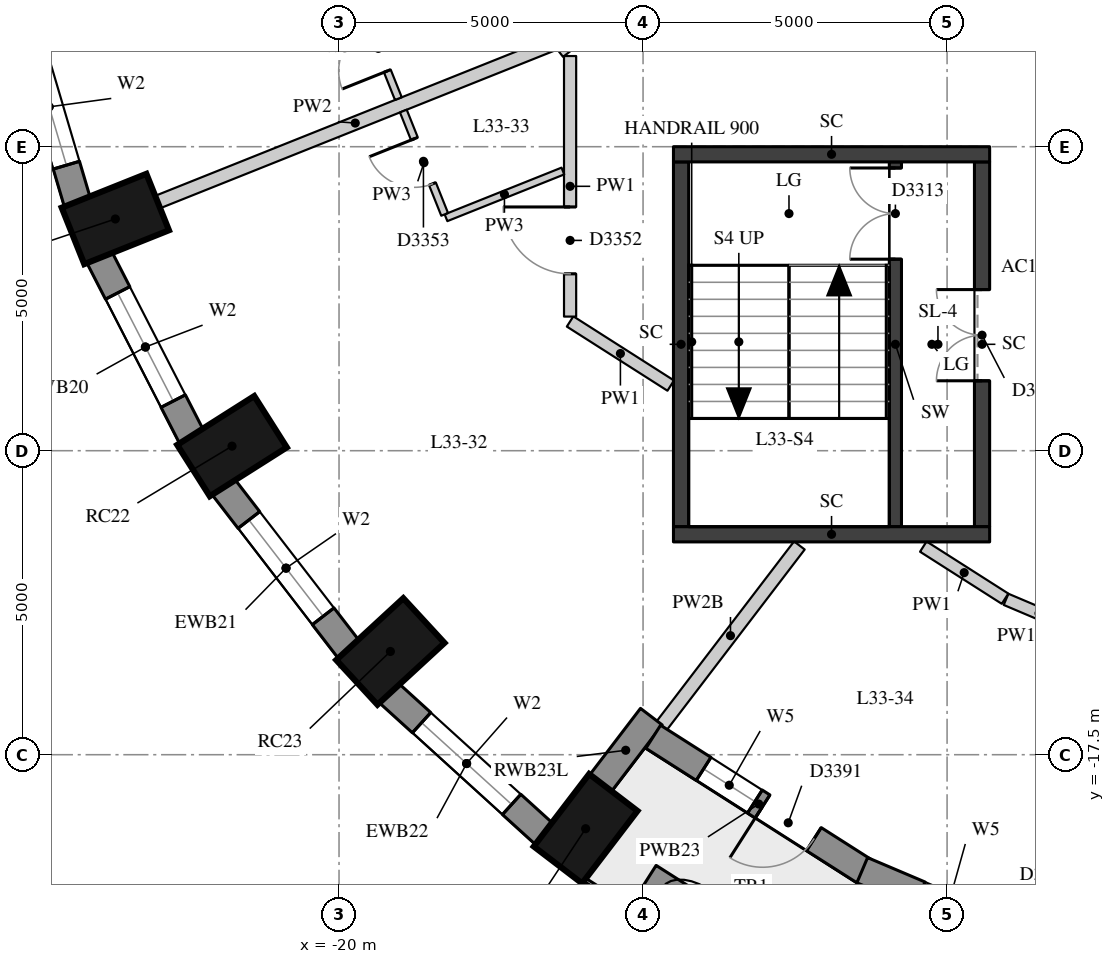
"""IFC4 building model, lengths in metres.
Left out: names, types, materials, properties, quantities, classifications, styles, units other than length and angle.
Written with IfcOpenShell. Run it as: python <this file> out.ifc"""

import sys

from ifc_helpers import new_model, si_unit, direction, frame, frame_2d, origin, origin_2d, place, context, subcontext, project, spatial, rectangle, extrude, element, fill, save


model = new_model("IFC4")
c1 = context("Model", 3, precision=1e-05, world=origin(), true_north=direction((0.0, 1.0)))
c2 = subcontext(c1, "Body", "Model", "MODEL_VIEW")
j1 = project(units=[si_unit("LENGTHUNIT", "METRE"), si_unit("PLANEANGLEUNIT", "RADIAN")], contexts=[c1])
p1 = place(None, origin())
s1 = spatial("IfcSite", under=j1, at=p1, CompositionType="ELEMENT")
p2 = place(p1, origin())
s2 = spatial("IfcBuilding", under=s1, at=p2, CompositionType="ELEMENT")
p3 = place(p2, frame((0.0, 0.0, 118.6)))
s3 = spatial("IfcBuildingStorey", under=s2, at=p3, CompositionType="ELEMENT", Elevation=118.6)
for number, where, z_axis, x_axis in (
    (1, (-23.679, -8.689, 0.0), (0.0, 0.0, 1.0), (-0.929, -0.371, 0.0)),
    (2, (-21.76, -12.425, 0.0), (0.0, 0.0, 1.0), (-0.845, -0.536, 0.0)),
    (3, (-19.156, -15.802, 0.0), (0.0, 0.0, 1.0), (-0.735, -0.678, 0.0)),
    (4, (-15.945, -18.717, 0.0), (0.0, 0.0, 1.0), (-0.607, -0.795, 0.0)),
):
    element("IfcColumn", number, at=place(p3, frame(where, z_axis=z_axis, x_axis=x_axis)), inside=s3, PredefinedType="COLUMN", context=c2, shape_type="SweptSolid", body=[
        extrude(rectangle(XDim=1.5, YDim=1.0, at=origin_2d()), origin(), (0.0, 0.0, 1.0), 3.3),
    ])
p4 = place(p3, frame((-25.232, -5.269, 0.0), z_axis=(0.0, 0.0, 1.0), x_axis=(0.283051078697, -0.959104836214, 0.0)))
e5 = element("IfcWall", 5, at=p4, inside=s3, PredefinedType="SOLIDWALL", context=c2, shape_type="SweptSolid", body=[
    extrude(rectangle(XDim=3.286, YDim=0.45, at=frame_2d((1.643, 0.0))), origin(), (0.0, 0.0, 1.0), 3.02),
])
p5 = place(p4, frame((0.643, 0.0, 0.4)))
e6 = element("IfcOpeningElement", 6, at=p5, cuts=e5, PredefinedType="OPENING", context=c2, shape_type="SweptSolid", body=[
    extrude(rectangle(XDim=2.0, YDim=1.75, at=frame_2d((1.0, 0.875))), frame((0.0, 0.235, 0.0), z_axis=(0.0, -1.0, 0.0), x_axis=(1.0, 0.0, 0.0)), (0.0, 0.0, 1.0), 0.47),
])
p6 = place(p3, frame((-23.945, -9.312, 0.0), z_axis=(0.0, 0.0, 1.0), x_axis=(0.456828186229, -0.889554949549, 0.0)))
e7 = element("IfcWall", 7, at=p6, inside=s3, PredefinedType="SOLIDWALL", context=c2, shape_type="SweptSolid", body=[
    extrude(rectangle(XDim=3.333, YDim=0.45, at=frame_2d((1.667, 0.0))), origin(), (0.0, 0.0, 1.0), 3.02),
])
p7 = place(p6, frame((0.666, 0.0, 0.4)))
e8 = element("IfcOpeningElement", 8, at=p7, cuts=e7, PredefinedType="OPENING", context=c2, shape_type="SweptSolid", body=[
    extrude(rectangle(XDim=2.0, YDim=1.75, at=frame_2d((1.0, 0.875))), frame((0.0, 0.235, 0.0), z_axis=(0.0, -1.0, 0.0), x_axis=(1.0, 0.0, 0.0)), (0.0, 0.0, 1.0), 0.47),
])
p8 = place(p3, frame((-21.908, -13.087, 0.0), z_axis=(0.0, 0.0, 1.0), x_axis=(0.610693945156, -0.791866721961, 0.0)))
e9 = element("IfcWall", 9, at=p8, inside=s3, PredefinedType="SOLIDWALL", context=c2, shape_type="SweptSolid", body=[
    extrude(rectangle(XDim=3.395, YDim=0.45, at=frame_2d((1.697, 0.0))), origin(), (0.0, 0.0, 1.0), 3.02),
])
p9 = place(p8, frame((0.697, 0.0, 0.4)))
e10 = element("IfcOpeningElement", 10, at=p9, cuts=e9, PredefinedType="OPENING", context=c2, shape_type="SweptSolid", body=[
    extrude(rectangle(XDim=2.0, YDim=1.75, at=frame_2d((1.0, 0.875))), frame((0.0, 0.235, 0.0), z_axis=(0.0, -1.0, 0.0), x_axis=(1.0, 0.0, 0.0)), (0.0, 0.0, 1.0), 0.47),
])
p10 = place(p3, frame((-19.184, -16.481, 0.0), z_axis=(0.0, 0.0, 1.0), x_axis=(0.740364106106, -0.672206062446, 0.0)))
e11 = element("IfcWall", 11, at=p10, inside=s3, PredefinedType="SOLIDWALL", context=c2, shape_type="SweptSolid", body=[
    extrude(rectangle(XDim=3.464, YDim=0.45, at=frame_2d((1.732, 0.0))), origin(), (0.0, 0.0, 1.0), 3.02),
])
p11 = place(p10, frame((0.732, 0.0, 0.4)))
e12 = element("IfcOpeningElement", 12, at=p11, cuts=e11, PredefinedType="OPENING", context=c2, shape_type="SweptSolid", body=[
    extrude(rectangle(XDim=2.0, YDim=1.75, at=frame_2d((1.0, 0.875))), frame((0.0, 0.235, 0.0), z_axis=(0.0, -1.0, 0.0), x_axis=(1.0, 0.0, 0.0)), (0.0, 0.0, 1.0), 0.47),
])
p12 = place(p3, frame((-15.708, -17.979, 0.0), z_axis=(0.0, 0.0, 1.0), x_axis=(0.607026495834, 0.794681592435, 0.0)))
e13 = element("IfcWall", 13, at=p12, inside=s3, PredefinedType="SOLIDWALL", context=c2, shape_type="SweptSolid", body=[
    extrude(rectangle(XDim=1.391, YDim=0.45, at=frame_2d((0.695, 0.0))), origin(), (0.0, 0.0, 1.0), 2.57),
])
p13 = place(p3, frame((-14.833, -17.205, 0.0), z_axis=(0.0, 0.0, 1.0), x_axis=(0.843255766903, -0.537512522259, 0.0)))
e14 = element("IfcWall", 14, at=p13, inside=s3, PredefinedType="SOLIDWALL", context=c2, shape_type="SweptSolid", body=[
    extrude(rectangle(XDim=4.115, YDim=0.45, at=frame_2d((2.058, 0.0))), origin(), (0.0, 0.0, 1.0), 3.02),
])
p14 = place(p13, frame((0.983, 0.0, 0.4)))
e15 = element("IfcOpeningElement", 15, at=p14, cuts=e14, PredefinedType="OPENING", context=c2, shape_type="SweptSolid", body=[
    extrude(rectangle(XDim=1.0, YDim=1.75, at=frame_2d((0.5, 0.875))), frame((0.0, 0.235, 0.0), z_axis=(0.0, -1.0, 0.0), x_axis=(1.0, 0.0, 0.0)), (0.0, 0.0, 1.0), 0.47),
])
p15 = place(p13, frame((2.133, 0.0, 0.0)))
e16 = element("IfcOpeningElement", 16, at=p15, cuts=e14, PredefinedType="OPENING", context=c2, shape_type="SweptSolid", body=[
    extrude(rectangle(XDim=1.0, YDim=2.15, at=frame_2d((0.5, 1.075))), frame((0.0, 0.235, 0.0), z_axis=(0.0, -1.0, 0.0), x_axis=(1.0, 0.0, 0.0)), (0.0, 0.0, 1.0), 0.47),
])
p16 = place(p3, frame((-11.396, -19.399, 0.0), z_axis=(0.0, 0.0, 1.0), x_axis=(0.920496400713, -0.390751041296, 0.0)))
e17 = element("IfcWall", 17, at=p16, inside=s3, PredefinedType="SOLIDWALL", context=c2, shape_type="SweptSolid", body=[
    extrude(rectangle(XDim=4.207, YDim=0.45, at=frame_2d((2.104, 0.0))), origin(), (0.0, 0.0, 1.0), 3.02),
])
p17 = place(p16, frame((1.028, 0.0, 0.4)))
e18 = element("IfcOpeningElement", 18, at=p17, cuts=e17, PredefinedType="OPENING", context=c2, shape_type="SweptSolid", body=[
    extrude(rectangle(XDim=1.0, YDim=1.75, at=frame_2d((0.5, 0.875))), frame((0.0, 0.235, 0.0), z_axis=(0.0, -1.0, 0.0), x_axis=(1.0, 0.0, 0.0)), (0.0, 0.0, 1.0), 0.47),
])
p18 = place(p16, frame((2.178, 0.0, 0.0)))
e19 = element("IfcOpeningElement", 19, at=p18, cuts=e17, PredefinedType="OPENING", context=c2, shape_type="SweptSolid", body=[
    extrude(rectangle(XDim=1.0, YDim=2.15, at=frame_2d((0.5, 1.075))), frame((0.0, 0.235, 0.0), z_axis=(0.0, -1.0, 0.0), x_axis=(1.0, 0.0, 0.0)), (0.0, 0.0, 1.0), 0.47),
])
p19 = place(p3, frame((-14.973, -19.616, 0.0), z_axis=(0.0, 0.0, 1.0), x_axis=(0.843873638802, -0.536541966425, 0.0)))
e20 = element("IfcWall", 20, at=p19, inside=s3, PredefinedType="USERDEFINED", context=c2, shape_type="SweptSolid", body=[
    extrude(rectangle(XDim=1.8, YDim=0.7, at=frame_2d((0.9, 0.0))), origin(), (0.0, 0.0, 1.0), 0.75),
])
p20 = place(p3, frame((-10.85, -13.75, 0.0), z_axis=(0.0, 0.0, 1.0), x_axis=(0.0, 1.0, 0.0)))
e21 = element("IfcWall", 21, at=p20, inside=s3, PredefinedType="SHEAR", context=c2, shape_type="SweptSolid", body=[
    extrude(rectangle(XDim=6.0, YDim=0.2, at=frame_2d((3.0, 0.0))), origin(), (0.0, 0.0, 1.0), 3.02),
])
p21 = place(p20, frame((4.4, 0.0, 0.0)))
e22 = element("IfcOpeningElement", 22, at=p21, cuts=e21, PredefinedType="OPENING", context=c2, shape_type="SweptSolid", body=[
    extrude(rectangle(XDim=1.5, YDim=2.1, at=frame_2d((0.75, 1.05))), frame((0.0, 0.11, 0.0), z_axis=(0.0, -1.0, 0.0), x_axis=(1.0, 0.0, 0.0)), (0.0, 0.0, 1.0), 0.22),
])
p22 = place(p3, frame((-14.375, -13.75, -0.28), z_axis=(0.0, 0.0, 1.0), x_axis=(0.0, 1.0, 0.0)))
e23 = element("IfcWall", 23, at=p22, inside=s3, PredefinedType="SHEAR", context=c2, shape_type="SweptSolid", body=[
    extrude(rectangle(XDim=6.0, YDim=0.25, at=frame_2d((3.0, 0.0))), origin(), (0.0, 0.0, 1.0), 3.3),
])
p23 = place(p3, frame((-9.425, -13.75, -0.28), z_axis=(0.0, 0.0, 1.0), x_axis=(0.0, 1.0, 0.0)))
e24 = element("IfcWall", 24, at=p23, inside=s3, PredefinedType="SHEAR", context=c2, shape_type="SweptSolid", body=[
    extrude(rectangle(XDim=6.0, YDim=0.25, at=frame_2d((3.0, 0.0))), origin(), (0.0, 0.0, 1.0), 3.3),
])
p24 = place(p23, frame((2.4, 0.0, 0.28)))
e25 = element("IfcOpeningElement", 25, at=p24, cuts=e24, PredefinedType="OPENING", context=c2, shape_type="SweptSolid", body=[
    extrude(rectangle(XDim=1.5, YDim=2.1, at=frame_2d((0.75, 1.05))), frame((0.0, 0.135, 0.0), z_axis=(0.0, -1.0, 0.0), x_axis=(1.0, 0.0, 0.0)), (0.0, 0.0, 1.0), 0.27),
])
for number, where, z_axis, x_axis in (
    (26, (-14.5, -7.625, -0.28), (0.0, 0.0, 1.0), (1.0, 0.0, 0.0)),
    (27, (-14.5, -13.875, -0.28), (0.0, 0.0, 1.0), (1.0, 0.0, 0.0)),
):
    element("IfcWall", number, at=place(p3, frame(where, z_axis=z_axis, x_axis=x_axis)), inside=s3, PredefinedType="SHEAR", context=c2, shape_type="SweptSolid", body=[
        extrude(rectangle(XDim=5.2, YDim=0.25, at=frame_2d((2.6, 0.0))), origin(), (0.0, 0.0, 1.0), 3.3),
    ])
p25 = place(p3, frame((-14.545, -11.429, 0.0), z_axis=(0.0, 0.0, 1.0), x_axis=(-0.843261732334, 0.537503163507, 0.0)))
e28 = element("IfcWall", 28, at=p25, inside=s3, PredefinedType="PARTITIONING", context=c2, shape_type="SweptSolid", body=[
    extrude(rectangle(XDim=1.963, YDim=0.2, at=frame_2d((0.981, 0.0))), origin(), (0.0, 0.0, 1.0), 3.02),
])
p26 = place(p3, frame((-16.2, -10.294, 0.0), z_axis=(0.0, 0.0, 1.0), x_axis=(0.0, 1.0, 0.0)))
e29 = element("IfcWall", 29, at=p26, inside=s3, PredefinedType="PARTITIONING", context=c2, shape_type="SweptSolid", body=[
    extrude(rectangle(XDim=4.285, YDim=0.2, at=frame_2d((2.143, 0.0))), origin(), (0.0, 0.0, 1.0), 3.02),
])
p27 = place(p26, frame((0.703, 0.0, 0.0)))
e30 = element("IfcOpeningElement", 30, at=p27, cuts=e29, PredefinedType="OPENING", context=c2, shape_type="SweptSolid", body=[
    extrude(rectangle(XDim=1.1, YDim=2.1, at=frame_2d((0.55, 1.05))), frame((0.0, 0.11, 0.0), z_axis=(0.0, -1.0, 0.0), x_axis=(1.0, 0.0, 0.0)), (0.0, 0.0, 1.0), 0.22),
])
p28 = place(p3, frame((-16.237, -5.961, 0.0), z_axis=(0.0, 0.0, 1.0), x_axis=(-0.61310674242, 0.790000077468, 0.0)))
e31 = element("IfcWall", 31, at=p28, inside=s3, PredefinedType="PARTITIONING", context=c2, shape_type="SweptSolid", body=[
    extrude(rectangle(XDim=0.264, YDim=0.2, at=frame_2d((0.132, 0.0))), origin(), (0.0, 0.0, 1.0), 3.02),
])
p29 = place(p3, frame((-7.947, -15.404, 0.0), z_axis=(0.0, 0.0, 1.0), x_axis=(-0.920608906038, 0.390485905153, 0.0)))
e32 = element("IfcWall", 32, at=p29, inside=s3, PredefinedType="PARTITIONING", context=c2, shape_type="SweptSolid", body=[
    extrude(rectangle(XDim=1.177, YDim=0.2, at=frame_2d((0.588, 0.0))), origin(), (0.0, 0.0, 1.0), 3.02),
])
p30 = place(p3, frame((-9.047, -14.934, 0.0), z_axis=(0.0, 0.0, 1.0), x_axis=(-0.843232404468, 0.537549171755, 0.0)))
e33 = element("IfcWall", 33, at=p30, inside=s3, PredefinedType="PARTITIONING", context=c2, shape_type="SweptSolid", body=[
    extrude(rectangle(XDim=1.594, YDim=0.2, at=frame_2d((0.797, 0.0))), origin(), (0.0, 0.0, 1.0), 3.02),
])
p31 = place(p3, frame((-22.983, -8.41, 0.0), z_axis=(0.0, 0.0, 1.0), x_axis=(0.928551252469, 0.371204218105, 0.0)))
e34 = element("IfcWall", 34, at=p31, inside=s3, PredefinedType="PARTITIONING", context=c2, shape_type="SweptSolid", body=[
    extrude(rectangle(XDim=6.999, YDim=0.22, at=frame_2d((3.499, 0.0))), origin(), (0.0, 0.0, 1.0), 3.02),
])
p32 = place(p3, frame((-14.696, -17.025, 0.0), z_axis=(0.0, 0.0, 1.0), x_axis=(0.607059278405, 0.794656550028, 0.0)))
e35 = element("IfcWall", 35, at=p32, inside=s3, PredefinedType="PARTITIONING", context=c2, shape_type="SweptSolid", body=[
    extrude(rectangle(XDim=3.734, YDim=0.22, at=frame_2d((1.867, 0.0))), origin(), (0.0, 0.0, 1.0), 2.57),
])
p33 = place(p3, frame((-16.319, -7.9, 0.0), z_axis=(0.0, 0.0, 1.0), x_axis=(-0.92852548478, -0.371268668371, 0.0)))
e36 = element("IfcWall", 36, at=p33, inside=s3, PredefinedType="PARTITIONING", context=c2, shape_type="SweptSolid", body=[
    extrude(rectangle(XDim=2.07, YDim=0.12, at=frame_2d((1.035, 0.0))), origin(), (0.0, 0.0, 1.0), 3.02),
])
p34 = place(p3, frame((-19.703, -5.01, 0.0), z_axis=(0.0, 0.0, 1.0), x_axis=(0.371229680537, -0.928541073022, 0.0)))
e37 = element("IfcWall", 37, at=p34, inside=s3, PredefinedType="PARTITIONING", context=c2, shape_type="SweptSolid", body=[
    extrude(rectangle(XDim=1.83, YDim=0.12, at=frame_2d((0.915, 0.0))), origin(), (0.0, 0.0, 1.0), 3.02),
])
p35 = place(p34, frame((0.54, 0.0, 0.0)))
e38 = element("IfcOpeningElement", 38, at=p35, cuts=e37, PredefinedType="OPENING", context=c2, shape_type="SweptSolid", body=[
    extrude(rectangle(XDim=0.8, YDim=2.1, at=frame_2d((0.4, 1.05))), frame((0.0, 0.07, 0.0), z_axis=(0.0, -1.0, 0.0), x_axis=(1.0, 0.0, 0.0)), (0.0, 0.0, 1.0), 0.14),
])
p36 = place(p3, frame((-18.263, -8.613, 0.0), z_axis=(0.0, 0.0, 1.0), x_axis=(-0.371229680537, 0.928541073022, 0.0)))
e39 = element("IfcWall", 39, at=p36, inside=s3, PredefinedType="PARTITIONING", context=c2, shape_type="SweptSolid", body=[
    extrude(rectangle(XDim=1.83, YDim=0.12, at=frame_2d((0.915, 0.0))), origin(), (0.0, 0.0, 1.0), 3.02),
])
p37 = place(p36, frame((0.54, 0.0, 0.0)))
e40 = element("IfcOpeningElement", 40, at=p37, cuts=e39, PredefinedType="OPENING", context=c2, shape_type="SweptSolid", body=[
    extrude(rectangle(XDim=0.8, YDim=2.1, at=frame_2d((0.4, 1.05))), frame((0.0, 0.07, 0.0), z_axis=(0.0, -1.0, 0.0), x_axis=(1.0, 0.0, 0.0)), (0.0, 0.0, 1.0), 0.14),
])
p38 = place(p5, origin())
e41 = element("IfcWindow", 41, at=p38, inside=s3, PartitioningType="SINGLE_PANEL", PredefinedType="WINDOW", context=c2, shape_type="SweptSolid", body=[
    extrude(rectangle(XDim=2.0, YDim=1.75, at=frame_2d((1.0, 0.875))), frame((0.0, 0.035, 0.0), z_axis=(0.0, -1.0, 0.0), x_axis=(1.0, 0.0, 0.0)), (0.0, 0.0, 1.0), 0.06),
])
fill(e6, e41)
p39 = place(p7, origin())
e42 = element("IfcWindow", 42, at=p39, inside=s3, PartitioningType="SINGLE_PANEL", PredefinedType="WINDOW", context=c2, shape_type="SweptSolid", body=[
    extrude(rectangle(XDim=2.0, YDim=1.75, at=frame_2d((1.0, 0.875))), frame((0.0, 0.035, 0.0), z_axis=(0.0, -1.0, 0.0), x_axis=(1.0, 0.0, 0.0)), (0.0, 0.0, 1.0), 0.06),
])
fill(e8, e42)
p40 = place(p9, origin())
e43 = element("IfcWindow", 43, at=p40, inside=s3, PartitioningType="SINGLE_PANEL", PredefinedType="WINDOW", context=c2, shape_type="SweptSolid", body=[
    extrude(rectangle(XDim=2.0, YDim=1.75, at=frame_2d((1.0, 0.875))), frame((0.0, 0.035, 0.0), z_axis=(0.0, -1.0, 0.0), x_axis=(1.0, 0.0, 0.0)), (0.0, 0.0, 1.0), 0.06),
])
fill(e10, e43)
p41 = place(p11, origin())
e44 = element("IfcWindow", 44, at=p41, inside=s3, PartitioningType="SINGLE_PANEL", PredefinedType="WINDOW", context=c2, shape_type="SweptSolid", body=[
    extrude(rectangle(XDim=2.0, YDim=1.75, at=frame_2d((1.0, 0.875))), frame((0.0, 0.035, 0.0), z_axis=(0.0, -1.0, 0.0), x_axis=(1.0, 0.0, 0.0)), (0.0, 0.0, 1.0), 0.06),
])
fill(e12, e44)
p42 = place(p14, origin())
e45 = element("IfcWindow", 45, at=p42, inside=s3, PartitioningType="SINGLE_PANEL", PredefinedType="WINDOW", context=c2, shape_type="SweptSolid", body=[
    extrude(rectangle(XDim=1.0, YDim=1.75, at=frame_2d((0.5, 0.875))), frame((0.0, 0.035, 0.0), z_axis=(0.0, -1.0, 0.0), x_axis=(1.0, 0.0, 0.0)), (0.0, 0.0, 1.0), 0.06),
])
fill(e15, e45)
p43 = place(p15, frame((1.0, 0.0, 0.0), z_axis=(0.0, 0.0, 1.0), x_axis=(-1.0, 0.0, 0.0)))
e46 = element("IfcDoor", 46, at=p43, inside=s3, OperationType="SINGLE_SWING_RIGHT", PredefinedType="DOOR", context=c2, shape_type="SweptSolid", body=[
    extrude(rectangle(XDim=1.0, YDim=2.15, at=frame_2d((0.5, 1.075))), frame((0.0, 0.075, 0.0), z_axis=(0.0, -1.0, 0.0), x_axis=(1.0, 0.0, 0.0)), (0.0, 0.0, 1.0), 0.05),
])
fill(e16, e46)
p44 = place(p21, origin())
e47 = element("IfcDoor", 47, at=p44, inside=s3, OperationType="DOUBLE_DOOR_SINGLE_SWING", PredefinedType="DOOR", context=c2, shape_type="SweptSolid", body=[
    extrude(rectangle(XDim=1.5, YDim=2.1, at=frame_2d((0.75, 1.05))), frame((0.0, 0.025, 0.0), z_axis=(0.0, -1.0, 0.0), x_axis=(1.0, 0.0, 0.0)), (0.0, 0.0, 1.0), 0.05),
])
fill(e22, e47)
p45 = place(p24, origin())
e48 = element("IfcDoor", 48, at=p45, inside=s3, OperationType="DOUBLE_DOOR_SINGLE_SWING", PredefinedType="DOOR", context=c2, shape_type="SweptSolid", body=[
    extrude(rectangle(XDim=1.5, YDim=2.1, at=frame_2d((0.75, 1.05))), frame((0.0, 0.025, 0.0), z_axis=(0.0, -1.0, 0.0), x_axis=(1.0, 0.0, 0.0)), (0.0, 0.0, 1.0), 0.05),
])
fill(e25, e48)
p46 = place(p35, origin())
e49 = element("IfcDoor", 49, at=p46, inside=s3, OperationType="SINGLE_SWING_LEFT", PredefinedType="DOOR", context=c2, shape_type="SweptSolid", body=[
    extrude(rectangle(XDim=0.8, YDim=2.1, at=frame_2d((0.4, 1.05))), frame((0.0, 0.025, 0.0), z_axis=(0.0, -1.0, 0.0), x_axis=(1.0, 0.0, 0.0)), (0.0, 0.0, 1.0), 0.05),
])
fill(e38, e49)
p47 = place(p27, origin())
e50 = element("IfcDoor", 50, at=p47, inside=s3, OperationType="SINGLE_SWING_RIGHT", PredefinedType="DOOR", context=c2, shape_type="SweptSolid", body=[
    extrude(rectangle(XDim=1.1, YDim=2.1, at=frame_2d((0.55, 1.05))), frame((0.0, 0.025, 0.0), z_axis=(0.0, -1.0, 0.0), x_axis=(1.0, 0.0, 0.0)), (0.0, 0.0, 1.0), 0.05),
])
fill(e30, e50)
p48 = place(p37, origin())
e51 = element("IfcDoor", 51, at=p48, inside=s3, OperationType="SINGLE_SWING_RIGHT", PredefinedType="DOOR", context=c2, shape_type="SweptSolid", body=[
    extrude(rectangle(XDim=0.8, YDim=2.1, at=frame_2d((0.4, 1.05))), frame((0.0, 0.025, 0.0), z_axis=(0.0, -1.0, 0.0), x_axis=(1.0, 0.0, 0.0)), (0.0, 0.0, 1.0), 0.05),
])
fill(e40, e51)
save(model, sys.argv[1])
